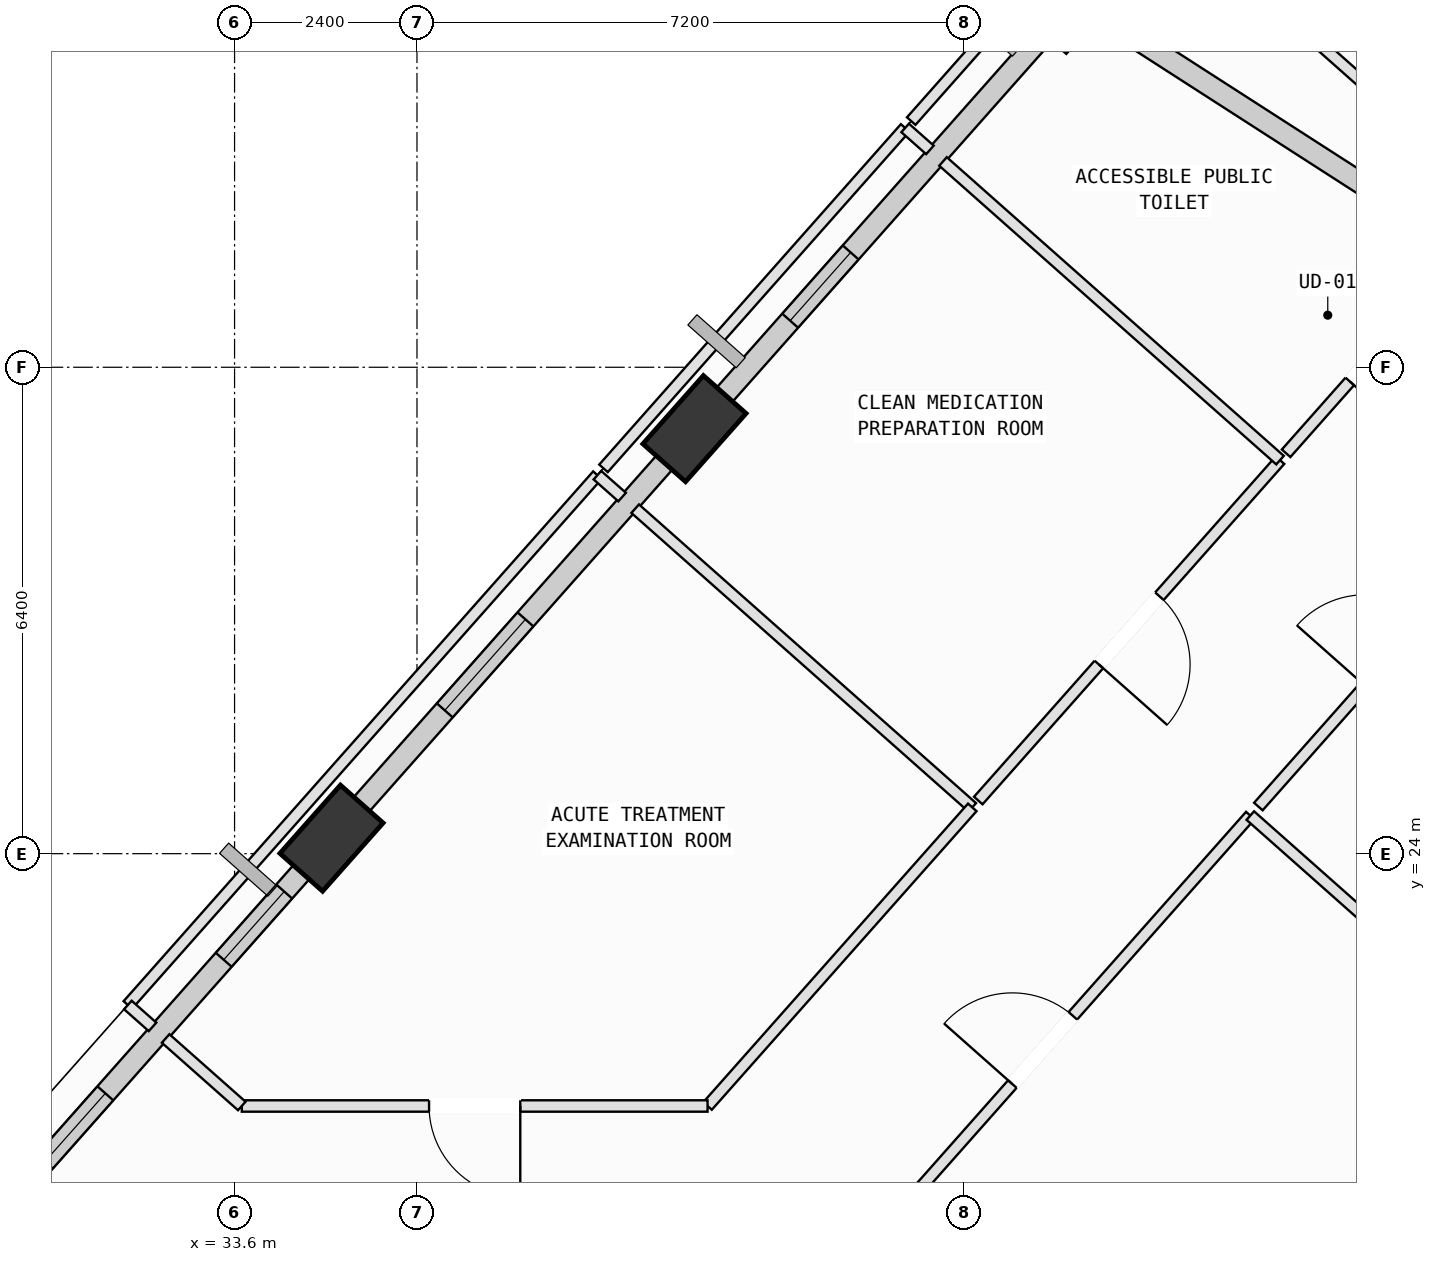
"""IFC4 building model, lengths in metres.
Left out: names, types, materials, properties, quantities, classifications, styles, units other than length and angle.
Written with IfcOpenShell. Run it as: python <this file> out.ifc"""

import sys

from ifc_helpers import new_model, si_unit, direction, frame, frame_2d, origin, origin_2d, place, context, subcontext, project, spatial, rectangle, extrude, element, fill, save


model = new_model("IFC4")
c1 = context("Model", 3, precision=1e-05, world=origin(), true_north=direction((0.0, 1.0)))
c2 = subcontext(c1, "Body", "Model", "MODEL_VIEW")
j1 = project(units=[si_unit("LENGTHUNIT", "METRE"), si_unit("PLANEANGLEUNIT", "RADIAN")], contexts=[c1])
p1 = place(None, origin())
s1 = spatial("IfcSite", under=j1, at=p1, CompositionType="ELEMENT")
p2 = place(p1, origin())
s2 = spatial("IfcBuilding", under=s1, at=p2, CompositionType="ELEMENT")
p3 = place(p2, frame((0.0, 0.0, 231.2)))
s3 = spatial("IfcBuildingStorey", under=s2, at=p3, CompositionType="ELEMENT", Elevation=231.2)
p4 = place(p3, frame((39.651, 29.592, 0.002), z_axis=(-0.020027637155, 0.024912426705, 0.999489001813), x_axis=(-0.048277843881, -0.998547449119, 0.023921572878)))
e1 = element("IfcColumn", 1, at=p4, inside=s3, PredefinedType="COLUMN", context=c2, shape_type="SweptSolid", body=[
    extrude(rectangle(XDim=1.2, YDim=0.75, at=origin_2d()), origin(), (0.0, 0.0, 1.0), 3.998),
])
p5 = place(p3, frame((34.876, 24.204, 0.002), z_axis=(0.002382511973, 0.0053148344, 0.999983037942), x_axis=(-0.911366062423, -0.411573687932, 0.004358860485)))
e2 = element("IfcColumn", 2, at=p5, inside=s3, PredefinedType="COLUMN", context=c2, shape_type="SweptSolid", body=[
    extrude(rectangle(XDim=1.2, YDim=0.75, at=origin_2d()), origin(), (0.0, 0.0, 1.0), 3.996),
])
p6 = place(p3, frame((44.889, 35.094, 0.0), z_axis=(0.0, 0.0, 1.0), x_axis=(0.840951921369, -0.541109846469, 0.0)))
e3 = element("IfcWall", 3, at=p6, inside=s3, PredefinedType="SOLIDWALL", context=c2, shape_type="SweptSolid", body=[
    extrude(rectangle(XDim=9.036, YDim=0.28, at=frame_2d((4.518, 0.0))), origin(), (0.0, 0.0, 1.0), 3.265),
])
p7 = place(p3, frame((39.919, 29.894, 0.0), z_axis=(0.0, 0.0, 1.0), x_axis=(0.663279097032, 0.748372126311, 0.0)))
e4 = element("IfcWall", 4, at=p7, inside=s3, PredefinedType="SOLIDWALL", context=c2, shape_type="SweptSolid", body=[
    extrude(rectangle(XDim=6.78, YDim=0.28, at=frame_2d((3.39, 0.0))), origin(), (0.0, 0.0, 1.0), 3.265),
])
p8 = place(p7, frame((1.495, 0.0, 0.75)))
e5 = element("IfcOpeningElement", 5, at=p8, cuts=e4, PredefinedType="OPENING", context=c2, shape_type="SweptSolid", body=[
    extrude(rectangle(XDim=1.2, YDim=1.75, at=frame_2d((0.6, 0.875))), frame((0.0, 0.15, 0.0), z_axis=(0.0, -1.0, 0.0), x_axis=(1.0, 0.0, 0.0)), (0.0, 0.0, 1.0), 0.3),
])
p9 = place(p3, frame((35.147, 24.51, 0.0), z_axis=(0.0, 0.0, 1.0), x_axis=(0.663277940137, 0.748373151661, 0.0)))
e6 = element("IfcWall", 6, at=p9, inside=s3, PredefinedType="SOLIDWALL", context=c2, shape_type="SweptSolid", body=[
    extrude(rectangle(XDim=6.409, YDim=0.28, at=frame_2d((3.205, 0.0))), origin(), (0.0, 0.0, 1.0), 3.265),
])
p10 = place(p9, frame((1.838, 0.0, 0.75)))
e7 = element("IfcOpeningElement", 7, at=p10, cuts=e6, PredefinedType="OPENING", context=c2, shape_type="SweptSolid", body=[
    extrude(rectangle(XDim=1.6, YDim=1.95, at=frame_2d((0.8, 0.975))), frame((0.0, 0.15, 0.0), z_axis=(0.0, -1.0, 0.0), x_axis=(1.0, 0.0, 0.0)), (0.0, 0.0, 1.0), 0.3),
])
p11 = place(p3, frame((30.535, 19.306, 0.0), z_axis=(0.0, 0.0, 1.0), x_axis=(0.663265631708, 0.748384060356, 0.0)))
e8 = element("IfcWall", 8, at=p11, inside=s3, PredefinedType="SOLIDWALL", context=c2, shape_type="SweptSolid", body=[
    extrude(rectangle(XDim=6.158, YDim=0.28, at=frame_2d((3.079, 0.0))), origin(), (0.0, 0.0, 1.0), 3.265),
])
p12 = place(p11, frame((0.858, 0.0, 0.75)))
e9 = element("IfcOpeningElement", 9, at=p12, cuts=e8, PredefinedType="OPENING", context=c2, shape_type="SweptSolid", body=[
    extrude(rectangle(XDim=1.2, YDim=1.75, at=frame_2d((0.6, 0.875))), frame((0.0, 0.15, 0.0), z_axis=(0.0, -1.0, 0.0), x_axis=(1.0, 0.0, 0.0)), (0.0, 0.0, 1.0), 0.3),
])
p13 = place(p11, frame((4.406, 0.0, 0.75)))
e10 = element("IfcOpeningElement", 10, at=p13, cuts=e8, PredefinedType="OPENING", context=c2, shape_type="SweptSolid", body=[
    extrude(rectangle(XDim=1.2, YDim=1.75, at=frame_2d((0.6, 0.875))), frame((0.0, 0.15, 0.0), z_axis=(0.0, -1.0, 0.0), x_axis=(1.0, 0.0, 0.0)), (0.0, 0.0, 1.0), 0.3),
])
p14 = place(p3, frame((41.499, 18.334, 0.0), z_axis=(0.0, 0.0, 1.0), x_axis=(0.663232090045, 0.748413785773, 0.0)))
e11 = element("IfcWall", 11, at=p14, inside=s3, PredefinedType="PARTITIONING", context=c2, shape_type="SweptSolid", body=[
    extrude(rectangle(XDim=8.24, YDim=0.15, at=frame_2d((4.12, 0.0))), origin(), (0.0, 0.0, 1.0), 3.78),
])
p15 = place(p14, frame((3.52, 0.0, 0.0)))
e12 = element("IfcOpeningElement", 12, at=p15, cuts=e11, PredefinedType="OPENING", context=c2, shape_type="SweptSolid", body=[
    extrude(rectangle(XDim=1.2, YDim=2.15, at=frame_2d((0.6, 1.075))), frame((0.0, 0.085, 0.0), z_axis=(0.0, -1.0, 0.0), x_axis=(1.0, 0.0, 0.0)), (0.0, 0.0, 1.0), 0.17),
])
p16 = place(p3, frame((46.964, 24.501, 0.0), z_axis=(0.0, 0.0, 1.0), x_axis=(0.748383631113, -0.663266116037, 0.0)))
e13 = element("IfcWall", 13, at=p16, inside=s3, PredefinedType="PARTITIONING", context=c2, shape_type="SweptSolid", body=[
    extrude(rectangle(XDim=11.935, YDim=0.15, at=frame_2d((5.967, 0.0))), origin(), (0.0, 0.0, 1.0), 3.78),
])
p17 = place(p3, frame((47.07, 24.62, 0.0), z_axis=(0.0, 0.0, 1.0), x_axis=(0.663187557716, 0.748453247231, 0.0)))
e14 = element("IfcWall", 14, at=p17, inside=s3, PredefinedType="PARTITIONING", context=c2, shape_type="SweptSolid", body=[
    extrude(rectangle(XDim=5.44, YDim=0.15, at=frame_2d((2.72, 0.0))), origin(), (0.0, 0.0, 1.0), 3.78),
])
p18 = place(p17, frame((2.12, 0.0, 0.0)))
e15 = element("IfcOpeningElement", 15, at=p18, cuts=e14, PredefinedType="OPENING", context=c2, shape_type="SweptSolid", body=[
    extrude(rectangle(XDim=1.2, YDim=2.15, at=frame_2d((0.6, 1.075))), frame((0.0, 0.085, 0.0), z_axis=(0.0, -1.0, 0.0), x_axis=(1.0, 0.0, 0.0)), (0.0, 0.0, 1.0), 0.17),
])
p19 = place(p3, frame((32.196, 22.009, 0.0), z_axis=(0.0, 0.0, 1.0), x_axis=(0.663258473272, 0.748390404557, 0.0)))
e16 = element("IfcWall", 16, at=p19, inside=s3, PredefinedType="PARTITIONING", context=c2, shape_type="SweptSolid", body=[
    extrude(rectangle(XDim=9.315, YDim=0.15, at=frame_2d((4.657, 0.0))), origin(), (0.0, 0.0, 1.0), 3.78),
])
p20 = place(p3, frame((38.374, 28.98, 0.0), z_axis=(0.0, 0.0, 1.0), x_axis=(0.748277169325, -0.663386220739, 0.0)))
e17 = element("IfcWall", 17, at=p20, inside=s3, PredefinedType="PARTITIONING", context=c2, shape_type="SweptSolid", body=[
    extrude(rectangle(XDim=0.434, YDim=0.15, at=frame_2d((0.217, 0.0))), origin(), (0.0, 0.0, 1.0), 3.78),
])
p21 = place(p3, frame((38.871, 28.539, 0.0), z_axis=(0.0, 0.0, 1.0), x_axis=(0.748404106831, -0.663243011933, 0.0)))
e18 = element("IfcWall", 18, at=p21, inside=s3, PredefinedType="PARTITIONING", context=c2, shape_type="SweptSolid", body=[
    extrude(rectangle(XDim=5.926, YDim=0.15, at=frame_2d((2.963, 0.0))), origin(), (0.0, 0.0, 1.0), 3.78),
])
p22 = place(p3, frame((43.306, 24.609, 0.0), z_axis=(0.0, 0.0, 1.0), x_axis=(-0.663353083876, -0.74830654555, 0.0)))
e19 = element("IfcWall", 19, at=p22, inside=s3, PredefinedType="PARTITIONING", context=c2, shape_type="SweptSolid", body=[
    extrude(rectangle(XDim=5.25, YDim=0.15, at=frame_2d((2.625, 0.0))), origin(), (0.0, 0.0, 1.0), 3.78),
])
p23 = place(p3, frame((39.823, 20.68, 0.0), z_axis=(0.0, 0.0, 1.0), x_axis=(-1.0, 0.0, 0.0)))
e20 = element("IfcWall", 20, at=p23, inside=s3, PredefinedType="PARTITIONING", context=c2, shape_type="SweptSolid", body=[
    extrude(rectangle(XDim=6.128, YDim=0.15, at=frame_2d((3.064, 0.0))), origin(), (0.0, 0.0, 1.0), 3.415),
])
p24 = place(p23, frame((2.464, 0.0, 0.0)))
e21 = element("IfcOpeningElement", 21, at=p24, cuts=e20, PredefinedType="OPENING", context=c2, shape_type="SweptSolid", body=[
    extrude(rectangle(XDim=1.2, YDim=2.15, at=frame_2d((0.6, 1.075))), frame((0.0, 0.085, 0.0), z_axis=(0.0, -1.0, 0.0), x_axis=(1.0, 0.0, 0.0)), (0.0, 0.0, 1.0), 0.17),
])
p25 = place(p3, frame((33.695, 20.68, 0.0), z_axis=(0.0, 0.0, 1.0), x_axis=(-0.748314025741, 0.663344645625, 0.0)))
e22 = element("IfcWall", 22, at=p25, inside=s3, PredefinedType="PARTITIONING", context=c2, shape_type="SweptSolid", body=[
    extrude(rectangle(XDim=1.339, YDim=0.15, at=frame_2d((0.669, 0.0))), origin(), (0.0, 0.0, 1.0), 3.78),
])
p26 = place(p3, frame((32.521, 21.721, 0.0), z_axis=(0.0, 0.0, 1.0), x_axis=(-0.748277169325, 0.663386220739, 0.0)))
e23 = element("IfcWall", 23, at=p26, inside=s3, PredefinedType="PARTITIONING", context=c2, shape_type="SweptSolid", body=[
    extrude(rectangle(XDim=0.434, YDim=0.15, at=frame_2d((0.217, 0.0))), origin(), (0.0, 0.0, 1.0), 3.78),
])
p27 = place(p3, frame((47.355, 29.178, 0.0), z_axis=(0.0, 0.0, 1.0), x_axis=(-0.663302322505, -0.748351541029, 0.0)))
e24 = element("IfcWall", 24, at=p27, inside=s3, PredefinedType="PARTITIONING", context=c2, shape_type="SweptSolid", body=[
    extrude(rectangle(XDim=5.985, YDim=0.15, at=frame_2d((2.993, 0.0))), origin(), (0.0, 0.0, 1.0), 3.78),
])
p28 = place(p27, frame((2.393, 0.0, 0.0)))
e25 = element("IfcOpeningElement", 25, at=p28, cuts=e24, PredefinedType="OPENING", context=c2, shape_type="SweptSolid", body=[
    extrude(rectangle(XDim=1.2, YDim=2.15, at=frame_2d((0.6, 1.075))), frame((0.0, 0.085, 0.0), z_axis=(0.0, -1.0, 0.0), x_axis=(1.0, 0.0, 0.0)), (0.0, 0.0, 1.0), 0.17),
])
p29 = place(p3, frame((38.454, 29.07, 0.0), z_axis=(0.0, 0.0, 1.0), x_axis=(0.663210930947, 0.748432536086, 0.0)))
e26 = element("IfcWall", 26, at=p29, inside=s3, PredefinedType="PARTITIONING", context=c2, shape_type="SweptSolid", body=[
    extrude(rectangle(XDim=5.985, YDim=0.15, at=frame_2d((2.992, 0.0))), origin(), (0.0, 0.0, 1.0), 3.265),
])
p30 = place(p3, frame((42.423, 33.549, 0.0), z_axis=(0.0, 0.0, 1.0), x_axis=(0.74815091613, -0.66352860277, 0.0)))
e27 = element("IfcWall", 27, at=p30, inside=s3, PredefinedType="PARTITIONING", context=c2, shape_type="SweptSolid", body=[
    extrude(rectangle(XDim=0.436, YDim=0.15, at=frame_2d((0.218, 0.0))), origin(), (0.0, 0.0, 1.0), 3.78),
])
p31 = place(p3, frame((42.921, 33.108, 0.0), z_axis=(0.0, 0.0, 1.0), x_axis=(0.748370181547, -0.663281291287, 0.0)))
e28 = element("IfcWall", 28, at=p31, inside=s3, PredefinedType="PARTITIONING", context=c2, shape_type="SweptSolid", body=[
    extrude(rectangle(XDim=5.925, YDim=0.15, at=frame_2d((2.962, 0.0))), origin(), (0.0, 0.0, 1.0), 3.78),
])
p32 = place(p3, frame((46.491, 35.877, 0.0), z_axis=(0.0, 0.0, 1.0), x_axis=(0.748371830726, -0.663279430539, 0.0)))
e29 = element("IfcWall", 29, at=p32, inside=s3, PredefinedType="PARTITIONING", context=c2, shape_type="SweptSolid", body=[
    extrude(rectangle(XDim=5.09, YDim=0.15, at=frame_2d((2.545, 0.0))), origin(), (0.0, 0.0, 1.0), 3.78),
])
p33 = place(p3, frame((49.721, 31.848, 0.0), z_axis=(0.0, 0.0, 1.0), x_axis=(-0.663180392012, -0.748459596539, 0.0)))
e30 = element("IfcWall", 30, at=p33, inside=s3, PredefinedType="PARTITIONING", context=c2, shape_type="SweptSolid", body=[
    extrude(rectangle(XDim=3.447, YDim=0.15, at=frame_2d((1.723, 0.0))), origin(), (0.0, 0.0, 1.0), 3.78),
])
p34 = place(p33, frame((1.263, 0.0, 0.0)))
e31 = element("IfcOpeningElement", 31, at=p34, cuts=e30, PredefinedType="OPENING", context=c2, shape_type="SweptSolid", body=[
    extrude(rectangle(XDim=0.92, YDim=2.1, at=frame_2d((0.46, 1.05))), frame((0.0, 0.085, 0.0), z_axis=(0.0, -1.0, 0.0), x_axis=(1.0, 0.0, 0.0)), (0.0, 0.0, 1.0), 0.17),
])
p35 = place(p3, frame((42.503, 33.639, 0.0), z_axis=(0.0, 0.0, 1.0), x_axis=(0.663214683657, 0.748429210669, 0.0)))
e32 = element("IfcWall", 32, at=p35, inside=s3, PredefinedType="PARTITIONING", context=c2, shape_type="SweptSolid", body=[
    extrude(rectangle(XDim=3.18, YDim=0.15, at=frame_2d((1.59, 0.0))), origin(), (0.0, 0.0, 1.0), 3.265),
])
p36 = place(p8, origin())
e33 = element("IfcWindow", 33, at=p36, inside=s3, PartitioningType="SINGLE_PANEL", PredefinedType="WINDOW", context=c2, shape_type="SweptSolid", body=[
    extrude(rectangle(XDim=1.2, YDim=1.75, at=frame_2d((0.6, 0.875))), frame((0.0, 0.03, 0.0), z_axis=(0.0, -1.0, 0.0), x_axis=(1.0, 0.0, 0.0)), (0.0, 0.0, 1.0), 0.06),
])
fill(e5, e33)
p37 = place(p10, origin())
e34 = element("IfcWindow", 34, at=p37, inside=s3, PartitioningType="SINGLE_PANEL", PredefinedType="WINDOW", context=c2, shape_type="SweptSolid", body=[
    extrude(rectangle(XDim=1.6, YDim=1.95, at=frame_2d((0.8, 0.975))), frame((0.0, 0.03, 0.0), z_axis=(0.0, -1.0, 0.0), x_axis=(1.0, 0.0, 0.0)), (0.0, 0.0, 1.0), 0.06),
])
fill(e7, e34)
p38 = place(p12, origin())
e35 = element("IfcWindow", 35, at=p38, inside=s3, PartitioningType="SINGLE_PANEL", PredefinedType="WINDOW", context=c2, shape_type="SweptSolid", body=[
    extrude(rectangle(XDim=1.2, YDim=1.75, at=frame_2d((0.6, 0.875))), frame((0.0, 0.03, 0.0), z_axis=(0.0, -1.0, 0.0), x_axis=(1.0, 0.0, 0.0)), (0.0, 0.0, 1.0), 0.06),
])
fill(e9, e35)
p39 = place(p13, origin())
e36 = element("IfcWindow", 36, at=p39, inside=s3, PartitioningType="SINGLE_PANEL", PredefinedType="WINDOW", context=c2, shape_type="SweptSolid", body=[
    extrude(rectangle(XDim=1.2, YDim=1.75, at=frame_2d((0.6, 0.875))), frame((0.0, 0.03, 0.0), z_axis=(0.0, -1.0, 0.0), x_axis=(1.0, 0.0, 0.0)), (0.0, 0.0, 1.0), 0.06),
])
fill(e10, e36)
p40 = place(p15, origin())
e37 = element("IfcDoor", 37, at=p40, inside=s3, OperationType="SINGLE_SWING_LEFT", PredefinedType="DOOR", context=c2, shape_type="SweptSolid", body=[
    extrude(rectangle(XDim=1.2, YDim=2.15, at=frame_2d((0.6, 1.075))), frame((0.0, 0.025, 0.0), z_axis=(0.0, -1.0, 0.0), x_axis=(1.0, 0.0, 0.0)), (0.0, 0.0, 1.0), 0.05),
])
fill(e12, e37)
p41 = place(p24, origin())
e38 = element("IfcDoor", 38, at=p41, inside=s3, OperationType="SINGLE_SWING_LEFT", PredefinedType="DOOR", context=c2, shape_type="SweptSolid", body=[
    extrude(rectangle(XDim=1.2, YDim=2.15, at=frame_2d((0.6, 1.075))), frame((0.0, 0.025, 0.0), z_axis=(0.0, -1.0, 0.0), x_axis=(1.0, 0.0, 0.0)), (0.0, 0.0, 1.0), 0.05),
])
fill(e21, e38)
p42 = place(p28, origin())
e39 = element("IfcDoor", 39, at=p42, inside=s3, OperationType="SINGLE_SWING_RIGHT", PredefinedType="DOOR", context=c2, shape_type="SweptSolid", body=[
    extrude(rectangle(XDim=1.2, YDim=2.15, at=frame_2d((0.6, 1.075))), frame((0.0, 0.025, 0.0), z_axis=(0.0, -1.0, 0.0), x_axis=(1.0, 0.0, 0.0)), (0.0, 0.0, 1.0), 0.05),
])
fill(e25, e39)
p43 = place(p34, origin())
e40 = element("IfcDoor", 40, at=p43, inside=s3, OperationType="SINGLE_SWING_RIGHT", PredefinedType="DOOR", context=c2, shape_type="SweptSolid", body=[
    extrude(rectangle(XDim=0.92, YDim=2.1, at=frame_2d((0.46, 1.05))), frame((0.0, 0.025, 0.0), z_axis=(0.0, -1.0, 0.0), x_axis=(1.0, 0.0, 0.0)), (0.0, 0.0, 1.0), 0.05),
])
fill(e31, e40)
save(model, sys.argv[1])
